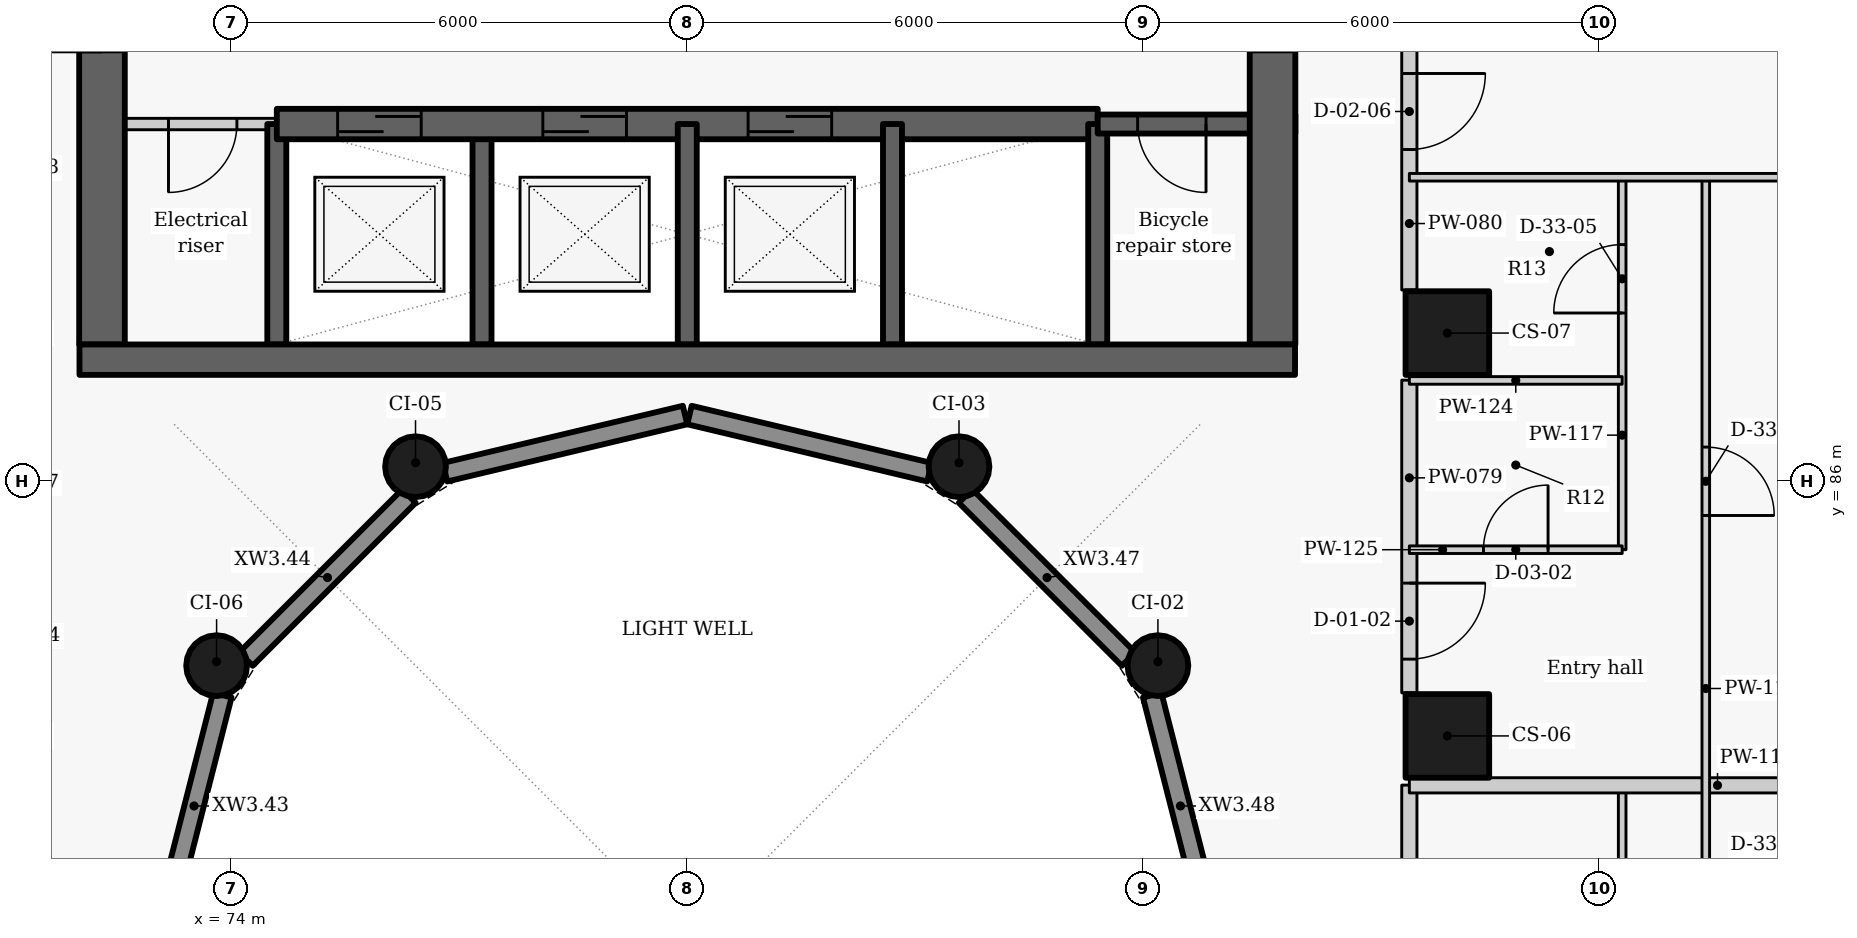
"""IFC4 building model, lengths in metres.
Left out: names, types, materials, properties, quantities, classifications, styles, units other than length and angle.
Written with IfcOpenShell. Run it as: python <this file> out.ifc"""

import sys

from ifc_helpers import new_model, si_unit, direction, frame, frame_2d, origin, origin_2d, place, context, subcontext, project, spatial, rectangle, circle, extrude, element, fill, save


model = new_model("IFC4")
c1 = context("Model", 3, precision=1e-05, world=origin(), true_north=direction((0.0, 1.0)))
c2 = subcontext(c1, "Body", "Model", "MODEL_VIEW")
j1 = project(units=[si_unit("LENGTHUNIT", "METRE"), si_unit("PLANEANGLEUNIT", "RADIAN")], contexts=[c1])
p1 = place(None, origin())
s1 = spatial("IfcSite", under=j1, at=p1, CompositionType="ELEMENT")
p2 = place(p1, origin())
s2 = spatial("IfcBuilding", under=s1, at=p2, CompositionType="ELEMENT")
p3 = place(p2, frame((0.0, 0.0, 44.7)))
s3 = spatial("IfcBuildingStorey", under=s2, at=p3, CompositionType="ELEMENT", Elevation=44.7)
for number, where, z_axis, x_axis in (
    (1, (90.0, 82.65, 0.0), (0.0, 0.0, 1.0), (0.0, 1.0, 0.0)),
    (2, (90.0, 87.95, 0.0), (0.0, 0.0, 1.0), (0.0, 1.0, 0.0)),
):
    element("IfcColumn", number, at=place(p3, frame(where, z_axis=z_axis, x_axis=x_axis)), inside=s3, PredefinedType="COLUMN", context=c2, shape_type="SweptSolid", body=[
        extrude(rectangle(XDim=1.1, YDim=1.1, at=origin_2d()), origin(), (0.0, 0.0, 1.0), 3.3),
    ])
for number, where, z_axis, x_axis in (
    (3, (86.192, 83.575, 0.0), (0.0, 0.0, 1.0), (-0.5, 0.866, 0.0)),
    (4, (83.575, 86.192, 0.0), (0.0, 0.0, 1.0), (-0.866, 0.5, 0.0)),
    (5, (76.425, 86.192, 0.0), (0.0, 0.0, 1.0), (-0.866, -0.5, 0.0)),
    (6, (73.808, 83.575, 0.0), (0.0, 0.0, 1.0), (-0.5, -0.866, 0.0)),
):
    element("IfcColumn", number, at=place(p3, frame(where, z_axis=z_axis, x_axis=x_axis)), inside=s3, PredefinedType="COLUMN", context=c2, shape_type="SweptSolid", body=[
        extrude(circle(Radius=0.4, at=origin_2d()), origin(), (0.0, 0.0, 1.0), 3.3),
    ])
p4 = place(p3, frame((73.14, 80.27, 0.0), z_axis=(0.0, 0.0, 1.0), x_axis=(0.247055971283, 0.969001211069, 0.0)))
e7 = element("IfcWall", 7, at=p4, inside=s3, PredefinedType="SOLIDWALL", context=c2, shape_type="SweptSolid", body=[
    extrude(rectangle(XDim=3.01, YDim=0.25, at=frame_2d((1.505, 0.0))), origin(), (0.0, 0.0, 1.0), 2.425),
])
p5 = place(p3, frame((74.194, 83.661, 0.0), z_axis=(0.0, 0.0, 1.0), x_axis=(0.707106781187, 0.707106781187, 0.0)))
e8 = element("IfcWall", 8, at=p5, inside=s3, PredefinedType="SOLIDWALL", context=c2, shape_type="SweptSolid", body=[
    extrude(rectangle(XDim=3.033, YDim=0.25, at=frame_2d((1.517, 0.0))), origin(), (0.0, 0.0, 1.0), 2.425),
])
for number, where, z_axis, x_axis in (
    (9, (76.814, 86.119, 0.0), (0.0, 0.0, 1.0), (0.973, 0.232, 0.0)),
    (10, (80.029, 86.872, 0.0), (0.0, 0.0, 1.0), (0.973, -0.232, 0.0)),
):
    element("IfcWall", number, at=place(p3, frame(where, z_axis=z_axis, x_axis=x_axis)), inside=s3, PredefinedType="SOLIDWALL", context=c2, shape_type="SweptSolid", body=[
        extrude(rectangle(XDim=3.246, YDim=0.25, at=frame_2d((1.623, 0.0))), origin(), (0.0, 0.0, 1.0), 2.425),
    ])
p6 = place(p3, frame((83.661, 85.806, 0.0), z_axis=(0.0, 0.0, 1.0), x_axis=(0.707106781187, -0.707106781187, 0.0)))
e11 = element("IfcWall", 11, at=p6, inside=s3, PredefinedType="SOLIDWALL", context=c2, shape_type="SweptSolid", body=[
    extrude(rectangle(XDim=3.033, YDim=0.25, at=frame_2d((1.517, 0.0))), origin(), (0.0, 0.0, 1.0), 2.425),
])
p7 = place(p3, frame((86.117, 83.187, 0.0), z_axis=(0.0, 0.0, 1.0), x_axis=(0.247055971283, -0.969001211069, 0.0)))
e12 = element("IfcWall", 12, at=p7, inside=s3, PredefinedType="SOLIDWALL", context=c2, shape_type="SweptSolid", body=[
    extrude(rectangle(XDim=3.01, YDim=0.25, at=frame_2d((1.505, 0.0))), origin(), (0.0, 0.0, 1.0), 2.425),
])
p8 = place(p3, frame((74.6, 87.8, -0.275), z_axis=(0.0, 0.0, 1.0), x_axis=(0.0, 1.0, 0.0)))
e13 = element("IfcWall", 13, at=p8, inside=s3, PredefinedType="SHEAR", context=c2, shape_type="SweptSolid", body=[
    extrude(rectangle(XDim=2.9, YDim=0.25, at=frame_2d((1.45, 0.0))), origin(), (0.0, 0.0, 1.0), 3.3),
])
p9 = place(p3, frame((74.6, 90.7, 0.0), z_axis=(0.0, 0.0, 1.0), x_axis=(-1.0, 0.0, 0.0)))
e14 = element("IfcWall", 14, at=p9, inside=s3, PredefinedType="PARTITIONING", context=c2, shape_type="SweptSolid", body=[
    extrude(rectangle(XDim=2.6, YDim=0.15, at=frame_2d((1.3, 0.0))), origin(), (0.0, 0.0, 1.0), 3.025),
])
p10 = place(p9, frame((0.525, 0.0, 0.0)))
e15 = element("IfcOpeningElement", 15, at=p10, cuts=e14, PredefinedType="OPENING", context=c2, shape_type="SweptSolid", body=[
    extrude(rectangle(XDim=0.9, YDim=2.1, at=frame_2d((0.45, 1.05))), frame((0.0, 0.085, 0.0), z_axis=(0.0, -1.0, 0.0), x_axis=(1.0, 0.0, 0.0)), (0.0, 0.0, 1.0), 0.17),
])
p11 = place(p3, frame((72.3, 87.8, -0.275), z_axis=(0.0, 0.0, 1.0), x_axis=(0.0, 1.0, 0.0)))
e16 = element("IfcWall", 16, at=p11, inside=s3, PredefinedType="SHEAR", context=c2, shape_type="SweptSolid", body=[
    extrude(rectangle(XDim=9.1, YDim=0.6, at=frame_2d((4.55, 0.0))), origin(), (0.0, 0.0, 1.0), 3.3),
])
p12 = place(p11, frame((3.85, 0.0, 0.275)))
e17 = element("IfcOpeningElement", 17, at=p12, cuts=e16, PredefinedType="OPENING", context=c2, shape_type="SweptSolid", body=[
    extrude(rectangle(XDim=1.5, YDim=2.1, at=frame_2d((0.75, 1.05))), frame((0.0, 0.31, 0.0), z_axis=(0.0, -1.0, 0.0), x_axis=(1.0, 0.0, 0.0)), (0.0, 0.0, 1.0), 0.62),
])
p13 = place(p3, frame((77.3, 87.8, -0.275), z_axis=(0.0, 0.0, 1.0), x_axis=(0.0, 1.0, 0.0)))
e18 = element("IfcWall", 18, at=p13, inside=s3, PredefinedType="SHEAR", context=c2, shape_type="SweptSolid", body=[
    extrude(rectangle(XDim=2.9, YDim=0.25, at=frame_2d((1.45, 0.0))), origin(), (0.0, 0.0, 1.0), 3.3),
])
p14 = place(p3, frame((74.6, 90.7, -0.275), z_axis=(0.0, 0.0, 1.0), x_axis=(1.0, 0.0, 0.0)))
e19 = element("IfcWall", 19, at=p14, inside=s3, PredefinedType="SHEAR", context=c2, shape_type="SweptSolid", body=[
    extrude(rectangle(XDim=10.8, YDim=0.4, at=frame_2d((5.4, 0.0))), origin(), (0.0, 0.0, 1.0), 3.3),
])
p15 = place(p14, frame((0.8, 0.0, 0.275)))
e20 = element("IfcOpeningElement", 20, at=p15, cuts=e19, PredefinedType="OPENING", context=c2, shape_type="SweptSolid", body=[
    extrude(rectangle(XDim=1.1, YDim=2.1, at=frame_2d((0.55, 1.05))), frame((0.0, 0.21, 0.0), z_axis=(0.0, -1.0, 0.0), x_axis=(1.0, 0.0, 0.0)), (0.0, 0.0, 1.0), 0.42),
])
p16 = place(p14, frame((3.5, 0.0, 0.275)))
e21 = element("IfcOpeningElement", 21, at=p16, cuts=e19, PredefinedType="OPENING", context=c2, shape_type="SweptSolid", body=[
    extrude(rectangle(XDim=1.1, YDim=2.1, at=frame_2d((0.55, 1.05))), frame((0.0, 0.21, 0.0), z_axis=(0.0, -1.0, 0.0), x_axis=(1.0, 0.0, 0.0)), (0.0, 0.0, 1.0), 0.42),
])
p17 = place(p14, frame((6.2, 0.0, 0.275)))
e22 = element("IfcOpeningElement", 22, at=p17, cuts=e19, PredefinedType="OPENING", context=c2, shape_type="SweptSolid", body=[
    extrude(rectangle(XDim=1.1, YDim=2.1, at=frame_2d((0.55, 1.05))), frame((0.0, 0.21, 0.0), z_axis=(0.0, -1.0, 0.0), x_axis=(1.0, 0.0, 0.0)), (0.0, 0.0, 1.0), 0.42),
])
for number, where, z_axis, x_axis in (
    (23, (80.0, 87.8, -0.275), (0.0, 0.0, 1.0), (0.0, 1.0, 0.0)),
    (24, (82.7, 87.8, -0.275), (0.0, 0.0, 1.0), (0.0, 1.0, 0.0)),
    (25, (85.4, 87.8, -0.275), (0.0, 0.0, 1.0), (0.0, 1.0, 0.0)),
):
    element("IfcWall", number, at=place(p3, frame(where, z_axis=z_axis, x_axis=x_axis)), inside=s3, PredefinedType="SHEAR", context=c2, shape_type="SweptSolid", body=[
        extrude(rectangle(XDim=2.9, YDim=0.25, at=frame_2d((1.45, 0.0))), origin(), (0.0, 0.0, 1.0), 3.3),
    ])
p18 = place(p3, frame((88.0, 90.7, -0.275), z_axis=(0.0, 0.0, 1.0), x_axis=(-1.0, 0.0, 0.0)))
e26 = element("IfcWall", 26, at=p18, inside=s3, PredefinedType="SHEAR", context=c2, shape_type="SweptSolid", body=[
    extrude(rectangle(XDim=2.6, YDim=0.25, at=frame_2d((1.3, 0.0))), origin(), (0.0, 0.0, 1.0), 3.3),
])
p19 = place(p18, frame((1.175, 0.0, 0.275)))
e27 = element("IfcOpeningElement", 27, at=p19, cuts=e26, PredefinedType="OPENING", context=c2, shape_type="SweptSolid", body=[
    extrude(rectangle(XDim=0.9, YDim=2.1, at=frame_2d((0.45, 1.05))), frame((0.0, 0.135, 0.0), z_axis=(0.0, -1.0, 0.0), x_axis=(1.0, 0.0, 0.0)), (0.0, 0.0, 1.0), 0.27),
])
p20 = place(p3, frame((87.7, 103.4, -0.275), z_axis=(0.0, 0.0, 1.0), x_axis=(0.0, -1.0, 0.0)))
e28 = element("IfcWall", 28, at=p20, inside=s3, PredefinedType="SHEAR", context=c2, shape_type="SweptSolid", body=[
    extrude(rectangle(XDim=15.6, YDim=0.6, at=frame_2d((7.8, 0.0))), origin(), (0.0, 0.0, 1.0), 3.3),
])
p21 = place(p20, frame((10.25, 0.0, 0.275)))
e29 = element("IfcOpeningElement", 29, at=p21, cuts=e28, PredefinedType="OPENING", context=c2, shape_type="SweptSolid", body=[
    extrude(rectangle(XDim=1.5, YDim=2.1, at=frame_2d((0.75, 1.05))), frame((0.0, 0.31, 0.0), z_axis=(0.0, -1.0, 0.0), x_axis=(1.0, 0.0, 0.0)), (0.0, 0.0, 1.0), 0.62),
])
p22 = place(p20, frame((2.7, 0.0, 0.275)))
e30 = element("IfcOpeningElement", 30, at=p22, cuts=e28, PredefinedType="OPENING", context=c2, shape_type="SweptSolid", body=[
    extrude(rectangle(XDim=1.1, YDim=2.1, at=frame_2d((0.55, 1.05))), frame((0.0, 0.31, 0.0), z_axis=(0.0, -1.0, 0.0), x_axis=(1.0, 0.0, 0.0)), (0.0, 0.0, 1.0), 0.62),
])
p23 = place(p3, frame((89.5, 77.917, 0.0), z_axis=(0.0, 0.0, 1.0), x_axis=(0.0, 1.0, 0.0)))
e31 = element("IfcWall", 31, at=p23, inside=s3, PredefinedType="PARTITIONING", context=c2, shape_type="SweptSolid", body=[
    extrude(rectangle(XDim=4.086, YDim=0.2, at=frame_2d((2.043, 0.0))), origin(), (0.0, 0.0, 1.0), 3.025),
])
p24 = place(p3, frame((89.5, 87.33, 0.0), z_axis=(0.0, 0.0, 1.0), x_axis=(0.0, -1.0, 0.0)))
e32 = element("IfcWall", 32, at=p24, inside=s3, PredefinedType="PARTITIONING", context=c2, shape_type="SweptSolid", body=[
    extrude(rectangle(XDim=4.113, YDim=0.2, at=frame_2d((2.057, 0.0))), origin(), (0.0, 0.0, 1.0), 3.025),
])
p25 = place(p24, frame((2.67, 0.0, 0.0)))
e33 = element("IfcOpeningElement", 33, at=p25, cuts=e32, PredefinedType="OPENING", context=c2, shape_type="SweptSolid", body=[
    extrude(rectangle(XDim=1.0, YDim=2.1, at=frame_2d((0.5, 1.05))), frame((0.0, 0.11, 0.0), z_axis=(0.0, -1.0, 0.0), x_axis=(1.0, 0.0, 0.0)), (0.0, 0.0, 1.0), 0.22),
])
p26 = place(p3, frame((89.5, 91.733, 0.0), z_axis=(0.0, 0.0, 1.0), x_axis=(0.0, -1.0, 0.0)))
e34 = element("IfcWall", 34, at=p26, inside=s3, PredefinedType="PARTITIONING", context=c2, shape_type="SweptSolid", body=[
    extrude(rectangle(XDim=3.216, YDim=0.2, at=frame_2d((1.608, 0.0))), origin(), (0.0, 0.0, 1.0), 3.025),
])
p27 = place(p26, frame((0.368, 0.0, 0.0)))
e35 = element("IfcOpeningElement", 35, at=p27, cuts=e34, PredefinedType="OPENING", context=c2, shape_type="SweptSolid", body=[
    extrude(rectangle(XDim=1.0, YDim=2.1, at=frame_2d((0.5, 1.05))), frame((0.0, 0.11, 0.0), z_axis=(0.0, -1.0, 0.0), x_axis=(1.0, 0.0, 0.0)), (0.0, 0.0, 1.0), 0.22),
])
p28 = place(p3, frame((92.3, 74.1, 0.0), z_axis=(0.0, 0.0, 1.0), x_axis=(0.0, 1.0, 0.0)))
e36 = element("IfcWall", 36, at=p28, inside=s3, PredefinedType="PARTITIONING", context=c2, shape_type="SweptSolid", body=[
    extrude(rectangle(XDim=7.9, YDim=0.1, at=frame_2d((3.95, 0.0))), origin(), (0.0, 0.0, 1.0), 3.025),
])
p29 = place(p28, frame((1.37, 0.0, 0.0)))
e37 = element("IfcOpeningElement", 37, at=p29, cuts=e36, PredefinedType="OPENING", context=c2, shape_type="SweptSolid", body=[
    extrude(rectangle(XDim=0.85, YDim=2.1, at=frame_2d((0.425, 1.05))), frame((0.0, 0.06, 0.0), z_axis=(0.0, -1.0, 0.0), x_axis=(1.0, 0.0, 0.0)), (0.0, 0.0, 1.0), 0.12),
])
p30 = place(p28, frame((5.295, 0.0, 0.0)))
e38 = element("IfcOpeningElement", 38, at=p30, cuts=e36, PredefinedType="OPENING", context=c2, shape_type="SweptSolid", body=[
    extrude(rectangle(XDim=0.9, YDim=2.1, at=frame_2d((0.45, 1.05))), frame((0.0, 0.06, 0.0), z_axis=(0.0, -1.0, 0.0), x_axis=(1.0, 0.0, 0.0)), (0.0, 0.0, 1.0), 0.12),
])
p31 = place(p3, frame((92.3, 85.1, 0.0), z_axis=(0.0, 0.0, 1.0), x_axis=(0.0, 1.0, 0.0)))
e39 = element("IfcWall", 39, at=p31, inside=s3, PredefinedType="PARTITIONING", context=c2, shape_type="SweptSolid", body=[
    extrude(rectangle(XDim=4.9, YDim=0.1, at=frame_2d((2.45, 0.0))), origin(), (0.0, 0.0, 1.0), 3.025),
])
p32 = place(p31, frame((3.114, 0.0, 0.0)))
e40 = element("IfcOpeningElement", 40, at=p32, cuts=e39, PredefinedType="OPENING", context=c2, shape_type="SweptSolid", body=[
    extrude(rectangle(XDim=0.9, YDim=2.1, at=frame_2d((0.45, 1.05))), frame((0.0, 0.06, 0.0), z_axis=(0.0, -1.0, 0.0), x_axis=(1.0, 0.0, 0.0)), (0.0, 0.0, 1.0), 0.12),
])
p33 = place(p3, frame((89.5, 82.0, 0.0), z_axis=(0.0, 0.0, 1.0), x_axis=(1.0, 0.0, 0.0)))
e41 = element("IfcWall", 41, at=p33, inside=s3, PredefinedType="PARTITIONING", context=c2, shape_type="SweptSolid", body=[
    extrude(rectangle(XDim=8.108, YDim=0.2, at=frame_2d((4.054, 0.0))), origin(), (0.0, 0.0, 1.0), 2.405),
])
p34 = place(p3, frame((93.4, 90.0, 0.0), z_axis=(0.0, 0.0, 1.0), x_axis=(0.0, -1.0, 0.0)))
e42 = element("IfcWall", 42, at=p34, inside=s3, PredefinedType="PARTITIONING", context=c2, shape_type="SweptSolid", body=[
    extrude(rectangle(XDim=18.0, YDim=0.1, at=frame_2d((9.0, 0.0))), origin(), (0.0, 0.0, 1.0), 3.025),
])
p35 = place(p34, frame((16.098, 0.0, 0.0)))
e43 = element("IfcOpeningElement", 43, at=p35, cuts=e42, PredefinedType="OPENING", context=c2, shape_type="SweptSolid", body=[
    extrude(rectangle(XDim=0.9, YDim=2.1, at=frame_2d((0.45, 1.05))), frame((0.0, 0.06, 0.0), z_axis=(0.0, -1.0, 0.0), x_axis=(1.0, 0.0, 0.0)), (0.0, 0.0, 1.0), 0.12),
])
p36 = place(p34, frame((12.55, 0.0, 0.0)))
e44 = element("IfcOpeningElement", 44, at=p36, cuts=e42, PredefinedType="OPENING", context=c2, shape_type="SweptSolid", body=[
    extrude(rectangle(XDim=0.9, YDim=2.1, at=frame_2d((0.45, 1.05))), frame((0.0, 0.06, 0.0), z_axis=(0.0, -1.0, 0.0), x_axis=(1.0, 0.0, 0.0)), (0.0, 0.0, 1.0), 0.12),
])
p37 = place(p34, frame((9.002, 0.0, 0.0)))
e45 = element("IfcOpeningElement", 45, at=p37, cuts=e42, PredefinedType="OPENING", context=c2, shape_type="SweptSolid", body=[
    extrude(rectangle(XDim=0.9, YDim=2.1, at=frame_2d((0.45, 1.05))), frame((0.0, 0.06, 0.0), z_axis=(0.0, -1.0, 0.0), x_axis=(1.0, 0.0, 0.0)), (0.0, 0.0, 1.0), 0.12),
])
p38 = place(p34, frame((3.55, 0.0, 0.0)))
e46 = element("IfcOpeningElement", 46, at=p38, cuts=e42, PredefinedType="OPENING", context=c2, shape_type="SweptSolid", body=[
    extrude(rectangle(XDim=0.9, YDim=2.1, at=frame_2d((0.45, 1.05))), frame((0.0, 0.06, 0.0), z_axis=(0.0, -1.0, 0.0), x_axis=(1.0, 0.0, 0.0)), (0.0, 0.0, 1.0), 0.12),
])
p39 = place(p3, frame((89.5, 87.327, 0.0), z_axis=(0.0, 0.0, 1.0), x_axis=(1.0, 0.0, 0.0)))
e47 = element("IfcWall", 47, at=p39, inside=s3, PredefinedType="PARTITIONING", context=c2, shape_type="SweptSolid", body=[
    extrude(rectangle(XDim=2.8, YDim=0.1, at=frame_2d((1.4, 0.0))), origin(), (0.0, 0.0, 1.0), 2.505),
])
p40 = place(p3, frame((89.5, 85.1, 0.0), z_axis=(0.0, 0.0, 1.0), x_axis=(1.0, 0.0, 0.0)))
e48 = element("IfcWall", 48, at=p40, inside=s3, PredefinedType="PARTITIONING", context=c2, shape_type="SweptSolid", body=[
    extrude(rectangle(XDim=2.8, YDim=0.1, at=frame_2d((1.4, 0.0))), origin(), (0.0, 0.0, 1.0), 2.505),
])
p41 = place(p40, frame((0.975, 0.0, 0.0)))
e49 = element("IfcOpeningElement", 49, at=p41, cuts=e48, PredefinedType="OPENING", context=c2, shape_type="SweptSolid", body=[
    extrude(rectangle(XDim=0.85, YDim=2.1, at=frame_2d((0.425, 1.05))), frame((0.0, 0.06, 0.0), z_axis=(0.0, -1.0, 0.0), x_axis=(1.0, 0.0, 0.0)), (0.0, 0.0, 1.0), 0.12),
])
p42 = place(p3, frame((89.5, 90.0, 0.0), z_axis=(0.0, 0.0, 1.0), x_axis=(1.0, 0.0, 0.0)))
e50 = element("IfcWall", 50, at=p42, inside=s3, PredefinedType="PARTITIONING", context=c2, shape_type="SweptSolid", body=[
    extrude(rectangle(XDim=12.093, YDim=0.1, at=frame_2d((6.046, 0.0))), origin(), (0.0, 0.0, 1.0), 2.405),
])
p43 = place(p3, frame((72.004, 87.6, -0.275), z_axis=(0.0, 0.0, 1.0), x_axis=(1.0, 0.0, 0.0)))
e51 = element("IfcWall", 51, at=p43, inside=s3, PredefinedType="SHEAR", context=c2, shape_type="SweptSolid", body=[
    extrude(rectangle(XDim=15.992, YDim=0.4, at=frame_2d((7.996, 0.0))), origin(), (0.0, 0.0, 1.0), 3.3),
])
p44 = place(p10, origin())
e52 = element("IfcDoor", 52, at=p44, inside=s3, OperationType="SINGLE_SWING_RIGHT", PredefinedType="DOOR", context=c2, shape_type="SweptSolid", body=[
    extrude(rectangle(XDim=0.9, YDim=2.1, at=frame_2d((0.45, 1.05))), frame((0.0, 0.025, 0.0), z_axis=(0.0, -1.0, 0.0), x_axis=(1.0, 0.0, 0.0)), (0.0, 0.0, 1.0), 0.05),
])
fill(e15, e52)
p45 = place(p15, origin())
e53 = element("IfcDoor", 53, at=p45, inside=s3, OperationType="SLIDING_TO_LEFT", PredefinedType="DOOR", context=c2, shape_type="SweptSolid", body=[
    extrude(rectangle(XDim=1.1, YDim=2.1, at=frame_2d((0.55, 1.05))), frame((0.0, 0.025, 0.0), z_axis=(0.0, -1.0, 0.0), x_axis=(1.0, 0.0, 0.0)), (0.0, 0.0, 1.0), 0.05),
])
fill(e20, e53)
p46 = place(p16, origin())
e54 = element("IfcDoor", 54, at=p46, inside=s3, OperationType="SLIDING_TO_LEFT", PredefinedType="DOOR", context=c2, shape_type="SweptSolid", body=[
    extrude(rectangle(XDim=1.1, YDim=2.1, at=frame_2d((0.55, 1.05))), frame((0.0, 0.025, 0.0), z_axis=(0.0, -1.0, 0.0), x_axis=(1.0, 0.0, 0.0)), (0.0, 0.0, 1.0), 0.05),
])
fill(e21, e54)
p47 = place(p17, origin())
e55 = element("IfcDoor", 55, at=p47, inside=s3, OperationType="SLIDING_TO_LEFT", PredefinedType="DOOR", context=c2, shape_type="SweptSolid", body=[
    extrude(rectangle(XDim=1.1, YDim=2.1, at=frame_2d((0.55, 1.05))), frame((0.0, 0.025, 0.0), z_axis=(0.0, -1.0, 0.0), x_axis=(1.0, 0.0, 0.0)), (0.0, 0.0, 1.0), 0.05),
])
fill(e22, e55)
p48 = place(p19, origin())
e56 = element("IfcDoor", 56, at=p48, inside=s3, OperationType="SINGLE_SWING_LEFT", PredefinedType="DOOR", context=c2, shape_type="SweptSolid", body=[
    extrude(rectangle(XDim=0.9, YDim=2.1, at=frame_2d((0.45, 1.05))), frame((0.0, 0.025, 0.0), z_axis=(0.0, -1.0, 0.0), x_axis=(1.0, 0.0, 0.0)), (0.0, 0.0, 1.0), 0.05),
])
fill(e27, e56)
p49 = place(p25, origin())
e57 = element("IfcDoor", 57, at=p49, inside=s3, OperationType="SINGLE_SWING_LEFT", PredefinedType="DOOR", context=c2, shape_type="SweptSolid", body=[
    extrude(rectangle(XDim=1.0, YDim=2.1, at=frame_2d((0.5, 1.05))), frame((0.0, 0.025, 0.0), z_axis=(0.0, -1.0, 0.0), x_axis=(1.0, 0.0, 0.0)), (0.0, 0.0, 1.0), 0.05),
])
fill(e33, e57)
p50 = place(p41, origin())
e58 = element("IfcDoor", 58, at=p50, inside=s3, OperationType="SINGLE_SWING_RIGHT", PredefinedType="DOOR", context=c2, shape_type="SweptSolid", body=[
    extrude(rectangle(XDim=0.85, YDim=2.1, at=frame_2d((0.425, 1.05))), frame((0.0, 0.025, 0.0), z_axis=(0.0, -1.0, 0.0), x_axis=(1.0, 0.0, 0.0)), (0.0, 0.0, 1.0), 0.05),
])
fill(e49, e58)
p51 = place(p32, origin())
e59 = element("IfcDoor", 59, at=p51, inside=s3, OperationType="SINGLE_SWING_LEFT", PredefinedType="DOOR", context=c2, shape_type="SweptSolid", body=[
    extrude(rectangle(XDim=0.9, YDim=2.1, at=frame_2d((0.45, 1.05))), frame((0.0, 0.025, 0.0), z_axis=(0.0, -1.0, 0.0), x_axis=(1.0, 0.0, 0.0)), (0.0, 0.0, 1.0), 0.05),
])
fill(e40, e59)
p52 = place(p38, origin())
e60 = element("IfcDoor", 60, at=p52, inside=s3, OperationType="SINGLE_SWING_RIGHT", PredefinedType="DOOR", context=c2, shape_type="SweptSolid", body=[
    extrude(rectangle(XDim=0.9, YDim=2.1, at=frame_2d((0.45, 1.05))), frame((0.0, 0.025, 0.0), z_axis=(0.0, -1.0, 0.0), x_axis=(1.0, 0.0, 0.0)), (0.0, 0.0, 1.0), 0.05),
])
fill(e46, e60)
p53 = place(p27, origin())
e61 = element("IfcDoor", 61, at=p53, inside=s3, OperationType="SINGLE_SWING_LEFT", PredefinedType="DOOR", context=c2, shape_type="SweptSolid", body=[
    extrude(rectangle(XDim=1.0, YDim=2.1, at=frame_2d((0.5, 1.05))), frame((0.0, 0.025, 0.0), z_axis=(0.0, -1.0, 0.0), x_axis=(1.0, 0.0, 0.0)), (0.0, 0.0, 1.0), 0.05),
])
fill(e35, e61)
save(model, sys.argv[1])
